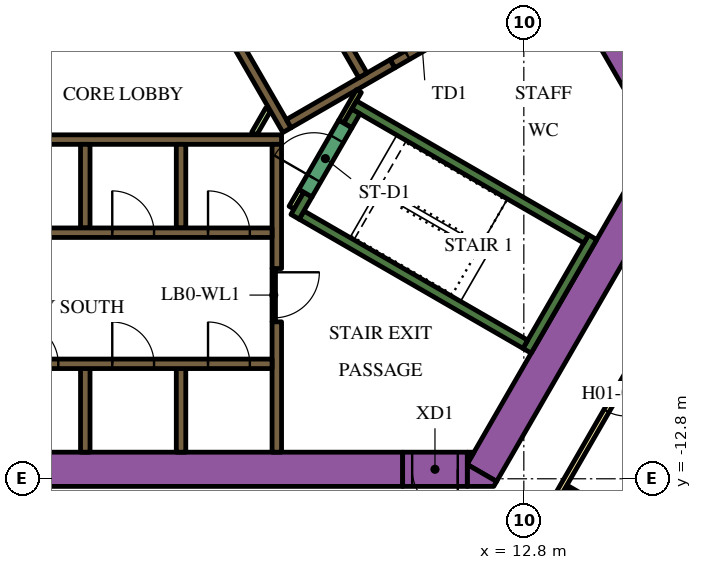
"""IFC4 building model, lengths in metres.
Left out: names, types, materials, properties, quantities, classifications, styles, units other than length and angle.
Written with IfcOpenShell. Run it as: python <this file> out.ifc"""

import sys

from ifc_helpers import new_model, si_unit, direction, frame, frame_2d, origin, place, context, subcontext, project, spatial, polyline, rectangle, outline, extrude, element, fill, save


model = new_model("IFC4")
c1 = context("Model", 3, precision=1e-05, world=origin(), true_north=direction((0.0, 1.0)))
c2 = subcontext(c1, "Body", "Model", "MODEL_VIEW")
j1 = project(units=[si_unit("LENGTHUNIT", "METRE"), si_unit("PLANEANGLEUNIT", "RADIAN")], contexts=[c1])
p1 = place(None, origin())
s1 = spatial("IfcSite", under=j1, at=p1, CompositionType="ELEMENT")
p2 = place(p1, origin())
s2 = spatial("IfcBuilding", under=s1, at=p2, CompositionType="ELEMENT")
p3 = place(p2, frame((0.0, 0.0, 31.5)))
s3 = spatial("IfcBuildingStorey", under=s2, at=p3, CompositionType="ELEMENT", Elevation=31.5)
p4 = place(p3, frame((6.711, 13.476, 0.0), z_axis=(0.0, 0.0, 1.0), x_axis=(0.500002723396, -0.866023831425, 0.0)))
e1 = element("IfcWall", 1, at=p4, inside=s3, PredefinedType="SOLIDWALL", context=c2, shape_type="SweptSolid", body=[
    extrude(rectangle(XDim=20.334, YDim=0.9, at=frame_2d((10.167, 0.0))), origin(), (0.0, 0.0, 1.0), 3.9),
])
p5 = place(p3, frame((11.695, -12.644, 0.0), z_axis=(0.0, 0.0, 1.0), x_axis=(0.500010229568, 0.86601949766, 0.0)))
e2 = element("IfcWall", 2, at=p5, inside=s3, PredefinedType="SOLIDWALL", context=c2, shape_type="SweptSolid", body=[
    extrude(rectangle(XDim=9.326, YDim=0.9, at=frame_2d((4.663, 0.0))), origin(), (0.0, 0.0, 1.0), 3.9),
])
p6 = place(p3, origin())
e3 = element("IfcWall", 3, at=p6, inside=s3, PredefinedType="SOLIDWALL", context=c2, shape_type="SweptSolid", body=[
    extrude(outline(polyline([(12.009, -13.0), (11.312, -13.0), (11.312, -12.425), (12.083, -12.871), (12.009, -13.0)])), origin(), (0.0, 0.0, 1.0), 3.9),
])
e4 = element("IfcWall", 4, at=p6, inside=s3, PredefinedType="SOLIDWALL", context=c2, shape_type="SweptSolid", body=[
    extrude(outline(polyline([(11.489, -12.1), (11.312, -12.407), (11.312, -12.1), (11.489, -12.1)])), origin(), (0.0, 0.0, 1.0), 3.9),
])
p7 = place(p3, frame((-12.019, -12.55, 0.0), z_axis=(0.0, 0.0, 1.0), x_axis=(1.0, 0.0, 0.0)))
e5 = element("IfcWall", 5, at=p7, inside=s3, PredefinedType="SOLIDWALL", context=c2, shape_type="SweptSolid", body=[
    extrude(rectangle(XDim=21.63, YDim=0.9, at=frame_2d((10.815, 0.0))), origin(), (0.0, 0.0, 1.0), 3.9),
])
p8 = place(p3, frame((12.885, -9.431, 0.0), z_axis=(0.0, 0.0, 1.0), x_axis=(0.500020560727, 0.866013532718, 0.0)))
e6 = element("IfcWall", 6, at=p8, inside=s3, PredefinedType="SOLIDWALL", context=c2, shape_type="SweptSolid", body=[
    extrude(rectangle(XDim=3.45, YDim=0.25, at=frame_2d((1.725, 0.0))), origin(), (0.0, 0.0, 1.0), 3.9),
])
p9 = place(p3, frame((12.84, -9.261, 0.0), z_axis=(0.0, 0.0, 1.0), x_axis=(-0.866013990052, 0.500019768644, 0.0)))
e7 = element("IfcWall", 7, at=p9, inside=s3, PredefinedType="SOLIDWALL", context=c2, shape_type="SweptSolid", body=[
    extrude(rectangle(XDim=6.8, YDim=0.25, at=frame_2d((3.4, 0.0))), origin(), (0.0, 0.0, 1.0), 3.9),
])
p10 = place(p3, frame((6.78, -5.906, 0.0), z_axis=(0.0, 0.0, 1.0), x_axis=(0.500223362819, 0.865896406789, 0.0)))
e8 = element("IfcWall", 8, at=p10, inside=s3, PredefinedType="SOLIDWALL", context=c2, shape_type="SweptSolid", body=[
    extrude(rectangle(XDim=0.675, YDim=0.25, at=frame_2d((0.337, 0.0))), origin(), (0.0, 0.0, 1.0), 3.9),
])
p11 = place(p3, frame((8.334, -2.964, 0.0), z_axis=(0.0, 0.0, 1.0), x_axis=(0.866016039709, -0.500016218704, 0.0)))
e9 = element("IfcWall", 9, at=p11, inside=s3, PredefinedType="SOLIDWALL", context=c2, shape_type="SweptSolid", body=[
    extrude(rectangle(XDim=7.05, YDim=0.25, at=frame_2d((3.525, 0.0))), origin(), (0.0, 0.0, 1.0), 3.9),
])
p12 = place(p3, frame((8.168, -3.503, 0.0), z_axis=(0.0, 0.0, 1.0), x_axis=(0.49972245349, 0.866185586049, 0.0)))
e10 = element("IfcWall", 10, at=p12, inside=s3, PredefinedType="SOLIDWALL", context=c2, shape_type="SweptSolid", body=[
    extrude(rectangle(XDim=0.425, YDim=0.25, at=frame_2d((0.212, 0.0))), origin(), (0.0, 0.0, 1.0), 3.9),
])
p13 = place(p3, frame((-5.545, -3.875, 0.0), z_axis=(0.0, 0.0, 1.0), x_axis=(1.0, 0.0, 0.0)))
e11 = element("IfcWall", 11, at=p13, inside=s3, PredefinedType="SOLIDWALL", context=c2, shape_type="SweptSolid", body=[
    extrude(rectangle(XDim=11.97, YDim=0.25, at=frame_2d((5.985, 0.0))), origin(), (0.0, 0.0, 1.0), 3.9),
])
p14 = place(p3, frame((6.3, -8.67, 0.0), z_axis=(0.0, 0.0, 1.0), x_axis=(0.0, -1.0, 0.0)))
e12 = element("IfcWall", 12, at=p14, inside=s3, PredefinedType="SOLIDWALL", context=c2, shape_type="SweptSolid", body=[
    extrude(rectangle(XDim=3.43, YDim=0.25, at=frame_2d((1.715, 0.0))), origin(), (0.0, 0.0, 1.0), 3.9),
])
p15 = place(p3, frame((6.3, -7.268, 0.0), z_axis=(0.0, 0.0, 1.0), x_axis=(0.0, 1.0, 0.0)))
e13 = element("IfcWall", 13, at=p15, inside=s3, PredefinedType="SOLIDWALL", context=c2, shape_type="SweptSolid", body=[
    extrude(rectangle(XDim=3.268, YDim=0.25, at=frame_2d((1.634, 0.0))), origin(), (0.0, 0.0, 1.0), 3.9),
])
for number, where, z_axis, x_axis in (
    (14, (3.78, -4.0, 0.0), (0.0, 0.0, 1.0), (0.0, -1.0, 0.0)),
    (15, (1.26, -4.0, 0.0), (0.0, 0.0, 1.0), (0.0, -1.0, 0.0)),
    (16, (3.78, -12.1, 0.0), (0.0, 0.0, 1.0), (0.0, 1.0, 0.0)),
    (17, (1.26, -12.1, 0.0), (0.0, 0.0, 1.0), (0.0, 1.0, 0.0)),
):
    element("IfcWall", number, at=place(p3, frame(where, z_axis=z_axis, x_axis=x_axis)), inside=s3, PredefinedType="SOLIDWALL", context=c2, shape_type="SweptSolid", body=[
        extrude(rectangle(XDim=2.2, YDim=0.25, at=frame_2d((1.1, 0.0))), origin(), (0.0, 0.0, 1.0), 3.9),
    ])
e18 = element("IfcWall", 18, at=p6, inside=s3, PredefinedType="SOLIDWALL", context=c2, shape_type="SweptSolid", body=[
    extrude(outline(polyline([(0.566, 6.725), (0.566, 6.875), (0.566, 6.875), (0.565, 6.875), (0.361, 6.875), (0.035, 7.439), (0.252, 7.564), (0.377, 7.348), (6.552, -3.348), (6.677, -3.564), (6.46, -3.689), (0.448, 6.725), (0.565, 6.725), (0.566, 6.725), (0.566, 6.725)])), origin(), (0.0, 0.0, 1.0), 3.9),
])
p16 = place(p3, frame((6.614, -3.456, 0.0), z_axis=(0.0, 0.0, 1.0), x_axis=(0.86602447079, 0.500001615989, 0.0)))
e19 = element("IfcWall", 19, at=p16, inside=s3, PredefinedType="SOLIDWALL", context=c2, shape_type="SweptSolid", body=[
    extrude(rectangle(XDim=3.154, YDim=0.25, at=frame_2d((1.577, 0.0))), origin(), (0.0, 0.0, 1.0), 3.9),
])
p17 = place(p3, frame((6.945, -5.222, 0.0), z_axis=(0.0, 0.0, 1.0), x_axis=(-0.499818422106, -0.866130212453, 0.0)))
e20 = element("IfcWall", 20, at=p17, inside=s3, PredefinedType="PARTITIONING", context=c2, shape_type="SweptSolid", body=[
    extrude(rectangle(XDim=0.514, YDim=0.15, at=frame_2d((0.257, 0.0))), origin(), (0.0, 0.0, 1.0), 2.75),
])
p18 = place(p3, frame((5.705, -3.718, 0.0), z_axis=(0.0, 0.0, 1.0), x_axis=(0.499962090823, 0.866047289552, 0.0)))
e21 = element("IfcWall", 21, at=p18, inside=s3, PredefinedType="PARTITIONING", context=c2, shape_type="SweptSolid", body=[
    extrude(rectangle(XDim=0.735, YDim=0.15, at=frame_2d((0.367, 0.0))), origin(), (0.0, 0.0, 1.0), 2.75),
])
p19 = place(p3, frame((8.459, -2.599, 0.0), z_axis=(0.0, 0.0, 1.0), x_axis=(-0.500041054325, -0.866001699761, 0.0)))
e22 = element("IfcWall", 22, at=p19, inside=s3, PredefinedType="PARTITIONING", context=c2, shape_type="SweptSolid", body=[
    extrude(rectangle(XDim=0.929, YDim=0.15, at=frame_2d((0.464, 0.0))), origin(), (0.0, 0.0, 1.0), 3.9),
])
p20 = place(p3, frame((-6.175, -9.775, 0.0), z_axis=(0.0, 0.0, 1.0), x_axis=(1.0, 0.0, 0.0)))
e23 = element("IfcWall", 23, at=p20, inside=s3, PredefinedType="SOLIDWALL", context=c2, shape_type="SweptSolid", body=[
    extrude(rectangle(XDim=12.35, YDim=0.25, at=frame_2d((6.175, 0.0))), origin(), (0.0, 0.0, 1.0), 3.9),
])
p21 = place(p20, frame((0.585, 0.0, 0.0)))
e24 = element("IfcOpeningElement", 24, at=p21, cuts=e23, PredefinedType="OPENING", context=c2, shape_type="SweptSolid", body=[
    extrude(rectangle(XDim=1.1, YDim=2.1, at=frame_2d((0.55, 1.05))), frame((0.0, 0.135, 0.0), z_axis=(0.0, -1.0, 0.0), x_axis=(1.0, 0.0, 0.0)), (0.0, 0.0, 1.0), 0.27),
])
p22 = place(p20, frame((3.105, 0.0, 0.0)))
e25 = element("IfcOpeningElement", 25, at=p22, cuts=e23, PredefinedType="OPENING", context=c2, shape_type="SweptSolid", body=[
    extrude(rectangle(XDim=1.1, YDim=2.1, at=frame_2d((0.55, 1.05))), frame((0.0, 0.135, 0.0), z_axis=(0.0, -1.0, 0.0), x_axis=(1.0, 0.0, 0.0)), (0.0, 0.0, 1.0), 0.27),
])
p23 = place(p20, frame((5.625, 0.0, 0.0)))
e26 = element("IfcOpeningElement", 26, at=p23, cuts=e23, PredefinedType="OPENING", context=c2, shape_type="SweptSolid", body=[
    extrude(rectangle(XDim=1.1, YDim=2.1, at=frame_2d((0.55, 1.05))), frame((0.0, 0.135, 0.0), z_axis=(0.0, -1.0, 0.0), x_axis=(1.0, 0.0, 0.0)), (0.0, 0.0, 1.0), 0.27),
])
p24 = place(p20, frame((8.145, 0.0, 0.0)))
e27 = element("IfcOpeningElement", 27, at=p24, cuts=e23, PredefinedType="OPENING", context=c2, shape_type="SweptSolid", body=[
    extrude(rectangle(XDim=1.1, YDim=2.1, at=frame_2d((0.55, 1.05))), frame((0.0, 0.135, 0.0), z_axis=(0.0, -1.0, 0.0), x_axis=(1.0, 0.0, 0.0)), (0.0, 0.0, 1.0), 0.27),
])
p25 = place(p20, frame((10.665, 0.0, 0.0)))
e28 = element("IfcOpeningElement", 28, at=p25, cuts=e23, PredefinedType="OPENING", context=c2, shape_type="SweptSolid", body=[
    extrude(rectangle(XDim=1.1, YDim=2.1, at=frame_2d((0.55, 1.05))), frame((0.0, 0.135, 0.0), z_axis=(0.0, -1.0, 0.0), x_axis=(1.0, 0.0, 0.0)), (0.0, 0.0, 1.0), 0.27),
])
p26 = place(p3, frame((-6.175, -6.325, 0.0), z_axis=(0.0, 0.0, 1.0), x_axis=(1.0, 0.0, 0.0)))
e29 = element("IfcWall", 29, at=p26, inside=s3, PredefinedType="SOLIDWALL", context=c2, shape_type="SweptSolid", body=[
    extrude(rectangle(XDim=12.35, YDim=0.25, at=frame_2d((6.175, 0.0))), origin(), (0.0, 0.0, 1.0), 3.9),
])
p27 = place(p26, frame((3.205, 0.0, 0.0)))
e30 = element("IfcOpeningElement", 30, at=p27, cuts=e29, PredefinedType="OPENING", context=c2, shape_type="SweptSolid", body=[
    extrude(rectangle(XDim=0.9, YDim=2.1, at=frame_2d((0.45, 1.05))), frame((0.0, 0.135, 0.0), z_axis=(0.0, -1.0, 0.0), x_axis=(1.0, 0.0, 0.0)), (0.0, 0.0, 1.0), 0.27),
])
p28 = place(p26, frame((8.145, 0.0, 0.0)))
e31 = element("IfcOpeningElement", 31, at=p28, cuts=e29, PredefinedType="OPENING", context=c2, shape_type="SweptSolid", body=[
    extrude(rectangle(XDim=1.1, YDim=2.1, at=frame_2d((0.55, 1.05))), frame((0.0, 0.135, 0.0), z_axis=(0.0, -1.0, 0.0), x_axis=(1.0, 0.0, 0.0)), (0.0, 0.0, 1.0), 0.27),
])
p29 = place(p26, frame((10.665, 0.0, 0.0)))
e32 = element("IfcOpeningElement", 32, at=p29, cuts=e29, PredefinedType="OPENING", context=c2, shape_type="SweptSolid", body=[
    extrude(rectangle(XDim=1.1, YDim=2.1, at=frame_2d((0.55, 1.05))), frame((0.0, 0.135, 0.0), z_axis=(0.0, -1.0, 0.0), x_axis=(1.0, 0.0, 0.0)), (0.0, 0.0, 1.0), 0.27),
])
p30 = place(p3, frame((8.565, -2.185, 0.0), z_axis=(0.0, 0.0, 1.0), x_axis=(-0.499997954832, 0.866026584559, 0.0)))
e33 = element("IfcWall", 33, at=p30, inside=s3, PredefinedType="SOLIDWALL", context=c2, shape_type="SweptSolid", body=[
    extrude(rectangle(XDim=12.35, YDim=0.25, at=frame_2d((6.175, 0.0))), origin(), (0.0, 0.0, 1.0), 3.9),
])
p31 = place(p30, frame((5.725, 0.0, 0.0)))
e34 = element("IfcOpeningElement", 34, at=p31, cuts=e33, PredefinedType="OPENING", context=c2, shape_type="SweptSolid", body=[
    extrude(rectangle(XDim=0.9, YDim=2.1, at=frame_2d((0.45, 1.05))), frame((0.0, 0.135, 0.0), z_axis=(0.0, -1.0, 0.0), x_axis=(1.0, 0.0, 0.0)), (0.0, 0.0, 1.0), 0.27),
])
p32 = place(p3, frame((7.053, -5.284, 0.0), z_axis=(0.0, 0.0, 1.0), x_axis=(0.500078061341, 0.865980330357, 0.0)))
e35 = element("IfcWall", 35, at=p32, inside=s3, PredefinedType="SOLIDWALL", context=c2, shape_type="SweptSolid", body=[
    extrude(rectangle(XDim=2.1, YDim=0.4, at=frame_2d((1.05, 0.0))), origin(), (0.0, 0.0, 1.0), 3.9),
])
p33 = place(p32, frame((0.45, 0.0, 0.0)))
e36 = element("IfcOpeningElement", 36, at=p33, cuts=e35, PredefinedType="OPENING", context=c2, shape_type="SweptSolid", body=[
    extrude(rectangle(XDim=1.2, YDim=2.1, at=frame_2d((0.6, 1.05))), frame((0.0, 0.21, 0.0), z_axis=(0.0, -1.0, 0.0), x_axis=(1.0, 0.0, 0.0)), (0.0, 0.0, 1.0), 0.42),
])
p34 = place(p3, frame((9.346, -1.879, 0.0), z_axis=(0.0, 0.0, 1.0), x_axis=(0.866047807691, 0.499961193289, 0.0)))
e37 = element("IfcWall", 37, at=p34, inside=s3, PredefinedType="SOLIDWALL", context=c2, shape_type="SweptSolid", body=[
    extrude(rectangle(XDim=1.8, YDim=0.25, at=frame_2d((0.9, 0.0))), origin(), (0.0, 0.0, 1.0), 3.9),
])
p35 = place(p34, frame((0.45, 0.0, 0.0)))
e38 = element("IfcOpeningElement", 38, at=p35, cuts=e37, PredefinedType="OPENING", context=c2, shape_type="SweptSolid", body=[
    extrude(rectangle(XDim=0.9, YDim=2.1, at=frame_2d((0.45, 1.05))), frame((0.0, 0.135, 0.0), z_axis=(0.0, -1.0, 0.0), x_axis=(1.0, 0.0, 0.0)), (0.0, 0.0, 1.0), 0.27),
])
p36 = place(p3, frame((6.22, -7.266, 0.0), z_axis=(0.0, 0.0, 1.0), x_axis=(0.0, -1.0, 0.0)))
e39 = element("IfcWall", 39, at=p36, inside=s3, PredefinedType="PARTITIONING", context=c2, shape_type="SweptSolid", body=[
    extrude(rectangle(XDim=1.4, YDim=0.09, at=frame_2d((0.7, 0.0))), origin(), (0.0, 0.0, 1.0), 2.75),
])
p37 = place(p36, frame((0.1, 0.0, 0.0)))
e40 = element("IfcOpeningElement", 40, at=p37, cuts=e39, PredefinedType="OPENING", context=c2, shape_type="SweptSolid", body=[
    extrude(rectangle(XDim=1.2, YDim=2.1, at=frame_2d((0.6, 1.05))), frame((0.0, 0.055, 0.0), z_axis=(0.0, -1.0, 0.0), x_axis=(1.0, 0.0, 0.0)), (0.0, 0.0, 1.0), 0.11),
])
p38 = place(p3, frame((11.312, -12.55, 0.0), z_axis=(0.0, 0.0, 1.0), x_axis=(-1.0, 0.0, 0.0)))
e41 = element("IfcWall", 41, at=p38, inside=s3, PredefinedType="SOLIDWALL", context=c2, shape_type="SweptSolid", body=[
    extrude(rectangle(XDim=1.7, YDim=0.9, at=frame_2d((0.85, 0.0))), origin(), (0.0, 0.0, 1.0), 3.9),
])
p39 = place(p38, frame((0.25, 0.0, 0.0)))
e42 = element("IfcOpeningElement", 42, at=p39, cuts=e41, PredefinedType="OPENING", context=c2, shape_type="SweptSolid", body=[
    extrude(rectangle(XDim=1.2, YDim=2.1, at=frame_2d((0.6, 1.05))), frame((0.0, 0.46, 0.0), z_axis=(0.0, -1.0, 0.0), x_axis=(1.0, 0.0, 0.0)), (0.0, 0.0, 1.0), 0.92),
])
p40 = place(p3, frame((6.163, 18.475, 0.0), z_axis=(0.0, 0.0, 1.0), x_axis=(0.500001317485, -0.866024643133, 0.0)))
e43 = element("IfcWall", 43, at=p40, inside=s3, PredefinedType="PARTITIONING", context=c2, shape_type="SweptSolid", body=[
    extrude(rectangle(XDim=25.767, YDim=0.15, at=frame_2d((12.883, 0.0))), origin(), (0.0, 0.0, 1.0), 2.75),
])
p41 = place(p40, frame((24.586, 0.0, 0.0)))
e44 = element("IfcOpeningElement", 44, at=p41, cuts=e43, PredefinedType="OPENING", context=c2, shape_type="SweptSolid", body=[
    extrude(rectangle(XDim=1.0, YDim=2.1, at=frame_2d((0.5, 1.05))), frame((0.0, 0.085, 0.0), z_axis=(0.0, -1.0, 0.0), x_axis=(1.0, 0.0, 0.0)), (0.0, 0.0, 1.0), 0.17),
])
p42 = place(p40, frame((19.319, 0.0, 0.0)))
e45 = element("IfcOpeningElement", 45, at=p42, cuts=e43, PredefinedType="OPENING", context=c2, shape_type="SweptSolid", body=[
    extrude(rectangle(XDim=1.0, YDim=2.1, at=frame_2d((0.5, 1.05))), frame((0.0, 0.085, 0.0), z_axis=(0.0, -1.0, 0.0), x_axis=(1.0, 0.0, 0.0)), (0.0, 0.0, 1.0), 0.17),
])
p43 = place(p40, frame((18.012, 0.0, 0.0)))
e46 = element("IfcOpeningElement", 46, at=p43, cuts=e43, PredefinedType="OPENING", context=c2, shape_type="SweptSolid", body=[
    extrude(rectangle(XDim=1.0, YDim=2.1, at=frame_2d((0.5, 1.05))), frame((0.0, 0.085, 0.0), z_axis=(0.0, -1.0, 0.0), x_axis=(1.0, 0.0, 0.0)), (0.0, 0.0, 1.0), 0.17),
])
p44 = place(p40, frame((6.824, 0.0, 0.0)))
e47 = element("IfcOpeningElement", 47, at=p44, cuts=e43, PredefinedType="OPENING", context=c2, shape_type="SweptSolid", body=[
    extrude(rectangle(XDim=1.1, YDim=2.1, at=frame_2d((0.55, 1.05))), frame((0.0, 0.085, 0.0), z_axis=(0.0, -1.0, 0.0), x_axis=(1.0, 0.0, 0.0)), (0.0, 0.0, 1.0), 0.17),
])
p45 = place(p40, frame((4.658, 0.0, 0.0)))
e48 = element("IfcOpeningElement", 48, at=p45, cuts=e43, PredefinedType="OPENING", context=c2, shape_type="SweptSolid", body=[
    extrude(rectangle(XDim=0.9, YDim=2.1, at=frame_2d((0.45, 1.05))), frame((0.0, 0.085, 0.0), z_axis=(0.0, -1.0, 0.0), x_axis=(1.0, 0.0, 0.0)), (0.0, 0.0, 1.0), 0.17),
])
p46 = place(p40, frame((0.18, 0.0, 0.0)))
e49 = element("IfcOpeningElement", 49, at=p46, cuts=e43, PredefinedType="OPENING", context=c2, shape_type="SweptSolid", body=[
    extrude(rectangle(XDim=1.0, YDim=2.1, at=frame_2d((0.5, 1.05))), frame((0.0, 0.085, 0.0), z_axis=(0.0, -1.0, 0.0), x_axis=(1.0, 0.0, 0.0)), (0.0, 0.0, 1.0), 0.17),
])
p47 = place(p3, frame((15.587, -9.952, 0.0), z_axis=(0.0, 0.0, 1.0), x_axis=(-0.500016618951, -0.866015808616, 0.0)))
e50 = element("IfcWall", 50, at=p47, inside=s3, PredefinedType="PARTITIONING", context=c2, shape_type="SweptSolid", body=[
    extrude(rectangle(XDim=5.268, YDim=0.15, at=frame_2d((2.634, 0.0))), origin(), (0.0, 0.0, 1.0), 2.75),
])
p48 = place(p47, frame((0.225, 0.0, 0.0)))
e51 = element("IfcOpeningElement", 51, at=p48, cuts=e50, PredefinedType="OPENING", context=c2, shape_type="SweptSolid", body=[
    extrude(rectangle(XDim=1.0, YDim=2.1, at=frame_2d((0.5, 1.05))), frame((0.0, 0.085, 0.0), z_axis=(0.0, -1.0, 0.0), x_axis=(1.0, 0.0, 0.0)), (0.0, 0.0, 1.0), 0.17),
])
p49 = place(p3, frame((16.16, -14.31, 0.0), z_axis=(0.0, 0.0, 1.0), x_axis=(-0.866062058628, 0.499936506574, 0.0)))
e52 = element("IfcWall", 52, at=p49, inside=s3, PredefinedType="PARTITIONING", context=c2, shape_type="SweptSolid", body=[
    extrude(rectangle(XDim=2.6, YDim=0.1, at=frame_2d((1.3, 0.0))), origin(), (0.0, 0.0, 1.0), 2.75),
])
p50 = place(p49, frame((1.1, 0.0, 0.0)))
e53 = element("IfcOpeningElement", 53, at=p50, cuts=e52, PredefinedType="OPENING", context=c2, shape_type="SweptSolid", body=[
    extrude(rectangle(XDim=0.9, YDim=2.1, at=frame_2d((0.45, 1.05))), frame((0.0, 0.06, 0.0), z_axis=(0.0, -1.0, 0.0), x_axis=(1.0, 0.0, 0.0)), (0.0, 0.0, 1.0), 0.12),
])
p51 = place(p23, origin())
e54 = element("IfcDoor", 54, at=p51, inside=s3, OperationType="DOUBLE_DOOR_SLIDING", PredefinedType="DOOR", context=c2, shape_type="SweptSolid", body=[
    extrude(rectangle(XDim=1.1, YDim=2.1, at=frame_2d((0.55, 1.05))), frame((0.0, 0.025, 0.0), z_axis=(0.0, -1.0, 0.0), x_axis=(1.0, 0.0, 0.0)), (0.0, 0.0, 1.0), 0.05),
])
fill(e26, e54)
p52 = place(p24, origin())
e55 = element("IfcDoor", 55, at=p52, inside=s3, OperationType="DOUBLE_DOOR_SLIDING", PredefinedType="DOOR", context=c2, shape_type="SweptSolid", body=[
    extrude(rectangle(XDim=1.1, YDim=2.1, at=frame_2d((0.55, 1.05))), frame((0.0, 0.025, 0.0), z_axis=(0.0, -1.0, 0.0), x_axis=(1.0, 0.0, 0.0)), (0.0, 0.0, 1.0), 0.05),
])
fill(e27, e55)
p53 = place(p25, origin())
e56 = element("IfcDoor", 56, at=p53, inside=s3, OperationType="DOUBLE_DOOR_SLIDING", PredefinedType="DOOR", context=c2, shape_type="SweptSolid", body=[
    extrude(rectangle(XDim=1.1, YDim=2.1, at=frame_2d((0.55, 1.05))), frame((0.0, 0.025, 0.0), z_axis=(0.0, -1.0, 0.0), x_axis=(1.0, 0.0, 0.0)), (0.0, 0.0, 1.0), 0.05),
])
fill(e28, e56)
p54 = place(p28, origin())
e57 = element("IfcDoor", 57, at=p54, inside=s3, OperationType="DOUBLE_DOOR_SLIDING", PredefinedType="DOOR", context=c2, shape_type="SweptSolid", body=[
    extrude(rectangle(XDim=1.1, YDim=2.1, at=frame_2d((0.55, 1.05))), frame((0.0, 0.025, 0.0), z_axis=(0.0, -1.0, 0.0), x_axis=(1.0, 0.0, 0.0)), (0.0, 0.0, 1.0), 0.05),
])
fill(e31, e57)
p55 = place(p29, origin())
e58 = element("IfcDoor", 58, at=p55, inside=s3, OperationType="DOUBLE_DOOR_SLIDING", PredefinedType="DOOR", context=c2, shape_type="SweptSolid", body=[
    extrude(rectangle(XDim=1.1, YDim=2.1, at=frame_2d((0.55, 1.05))), frame((0.0, 0.025, 0.0), z_axis=(0.0, -1.0, 0.0), x_axis=(1.0, 0.0, 0.0)), (0.0, 0.0, 1.0), 0.05),
])
fill(e32, e58)
p56 = place(p33, origin())
e59 = element("IfcDoor", 59, at=p56, inside=s3, OperationType="SINGLE_SWING_LEFT", PredefinedType="DOOR", context=c2, shape_type="SweptSolid", body=[
    extrude(rectangle(XDim=1.2, YDim=2.1, at=frame_2d((0.6, 1.05))), frame((0.0, 0.025, 0.0), z_axis=(0.0, -1.0, 0.0), x_axis=(1.0, 0.0, 0.0)), (0.0, 0.0, 1.0), 0.05),
])
fill(e36, e59)
p57 = place(p35, origin())
e60 = element("IfcDoor", 60, at=p57, inside=s3, OperationType="SINGLE_SWING_LEFT", PredefinedType="DOOR", context=c2, shape_type="SweptSolid", body=[
    extrude(rectangle(XDim=0.9, YDim=2.1, at=frame_2d((0.45, 1.05))), frame((0.0, 0.025, 0.0), z_axis=(0.0, -1.0, 0.0), x_axis=(1.0, 0.0, 0.0)), (0.0, 0.0, 1.0), 0.05),
])
fill(e38, e60)
p58 = place(p37, origin())
e61 = element("IfcDoor", 61, at=p58, inside=s3, OperationType="SINGLE_SWING_LEFT", PredefinedType="DOOR", context=c2, shape_type="SweptSolid", body=[
    extrude(rectangle(XDim=1.2, YDim=2.1, at=frame_2d((0.6, 1.05))), frame((0.0, 0.025, 0.0), z_axis=(0.0, -1.0, 0.0), x_axis=(1.0, 0.0, 0.0)), (0.0, 0.0, 1.0), 0.05),
])
fill(e40, e61)
p59 = place(p39, origin())
e62 = element("IfcDoor", 62, at=p59, inside=s3, OperationType="SINGLE_SWING_LEFT", PredefinedType="DOOR", context=c2, shape_type="SweptSolid", body=[
    extrude(rectangle(XDim=1.2, YDim=2.1, at=frame_2d((0.6, 1.05))), frame((0.0, 0.025, 0.0), z_axis=(0.0, -1.0, 0.0), x_axis=(1.0, 0.0, 0.0)), (0.0, 0.0, 1.0), 0.05),
])
fill(e42, e62)
p60 = place(p48, origin())
e63 = element("IfcDoor", 63, at=p60, inside=s3, OperationType="SINGLE_SWING_LEFT", PredefinedType="DOOR", context=c2, shape_type="SweptSolid", body=[
    extrude(rectangle(XDim=1.0, YDim=2.1, at=frame_2d((0.5, 1.05))), frame((0.0, 0.025, 0.0), z_axis=(0.0, -1.0, 0.0), x_axis=(1.0, 0.0, 0.0)), (0.0, 0.0, 1.0), 0.05),
])
fill(e51, e63)
save(model, sys.argv[1])
